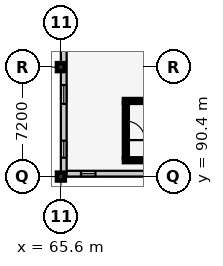
"""IFC4 building model, lengths in metres.
Left out: names, types, materials, properties, quantities, classifications, styles, units other than length and angle.
Written with IfcOpenShell. Run it as: python <this file> out.ifc"""

import sys

from ifc_helpers import new_model, si_unit, direction, frame, frame_2d, origin, origin_2d, place, context, subcontext, project, spatial, rectangle, extrude, element, fill, save


model = new_model("IFC4")
c1 = context("Model", 3, precision=1e-05, world=origin(), true_north=direction((0.0, 1.0)))
c2 = subcontext(c1, "Body", "Model", "MODEL_VIEW")
j1 = project(units=[si_unit("LENGTHUNIT", "METRE"), si_unit("PLANEANGLEUNIT", "RADIAN")], contexts=[c1])
p1 = place(None, origin())
s1 = spatial("IfcSite", under=j1, at=p1, CompositionType="ELEMENT")
p2 = place(p1, origin())
s2 = spatial("IfcBuilding", under=s1, at=p2, CompositionType="ELEMENT")
p3 = place(p2, frame((0.0, 0.0, 21.9)))
s3 = spatial("IfcBuildingStorey", under=s2, at=p3, CompositionType="ELEMENT", Elevation=21.9)
for number, where, z_axis, x_axis in (
    (1, (65.6, 90.4, 0.0), (0.0, 0.0, 1.0), (1.0, 0.0, 0.0)),
    (2, (65.6, 97.6, 0.0), (0.0, 0.0, 1.0), (1.0, 0.0, 0.0)),
):
    element("IfcColumn", number, at=place(p3, frame(where, z_axis=z_axis, x_axis=x_axis)), inside=s3, PredefinedType="COLUMN", context=c2, shape_type="SweptSolid", body=[
        extrude(rectangle(XDim=0.52, YDim=0.52, at=origin_2d()), origin(), (0.0, 0.0, 1.0), 3.9),
    ])
p4 = place(p3, frame((94.4, 90.59, 0.0), z_axis=(0.0, 0.0, 1.0), x_axis=(-1.0, 0.0, 0.0)))
e3 = element("IfcWall", 3, at=p4, inside=s3, PredefinedType="SOLIDWALL", context=c2, shape_type="SweptSolid", body=[
    extrude(rectangle(XDim=28.8, YDim=0.38, at=frame_2d((14.4, 0.0))), origin(), (0.0, 0.0, 1.0), 2.955),
])
p5 = place(p4, frame((1.05, 0.0, 0.9)))
e4 = element("IfcOpeningElement", 4, at=p5, cuts=e3, PredefinedType="OPENING", context=c2, shape_type="SweptSolid", body=[
    extrude(rectangle(XDim=1.5, YDim=1.75, at=frame_2d((0.75, 0.875))), frame((0.0, 0.202, 0.0), z_axis=(0.0, -1.0, 0.0), x_axis=(1.0, 0.0, 0.0)), (0.0, 0.0, 1.0), 0.404),
])
p6 = place(p4, frame((4.95, 0.0, 0.9)))
e5 = element("IfcOpeningElement", 5, at=p6, cuts=e3, PredefinedType="OPENING", context=c2, shape_type="SweptSolid", body=[
    extrude(rectangle(XDim=0.9, YDim=1.35, at=frame_2d((0.45, 0.675))), frame((0.0, 0.202, 0.0), z_axis=(0.0, -1.0, 0.0), x_axis=(1.0, 0.0, 0.0)), (0.0, 0.0, 1.0), 0.404),
])
p7 = place(p4, frame((8.5, 0.0, 0.9)))
e6 = element("IfcOpeningElement", 6, at=p7, cuts=e3, PredefinedType="OPENING", context=c2, shape_type="SweptSolid", body=[
    extrude(rectangle(XDim=1.0, YDim=1.35, at=frame_2d((0.5, 0.675))), frame((0.0, 0.202, 0.0), z_axis=(0.0, -1.0, 0.0), x_axis=(1.0, 0.0, 0.0)), (0.0, 0.0, 1.0), 0.404),
])
p8 = place(p4, frame((12.05, 0.0, 0.9)))
e7 = element("IfcOpeningElement", 7, at=p8, cuts=e3, PredefinedType="OPENING", context=c2, shape_type="SweptSolid", body=[
    extrude(rectangle(XDim=1.1, YDim=1.35, at=frame_2d((0.55, 0.675))), frame((0.0, 0.202, 0.0), z_axis=(0.0, -1.0, 0.0), x_axis=(1.0, 0.0, 0.0)), (0.0, 0.0, 1.0), 0.404),
])
p9 = place(p4, frame((15.6, 0.0, 0.9)))
e8 = element("IfcOpeningElement", 8, at=p9, cuts=e3, PredefinedType="OPENING", context=c2, shape_type="SweptSolid", body=[
    extrude(rectangle(XDim=1.2, YDim=1.35, at=frame_2d((0.6, 0.675))), frame((0.0, 0.202, 0.0), z_axis=(0.0, -1.0, 0.0), x_axis=(1.0, 0.0, 0.0)), (0.0, 0.0, 1.0), 0.404),
])
p10 = place(p4, frame((19.15, 0.0, 0.9)))
e9 = element("IfcOpeningElement", 9, at=p10, cuts=e3, PredefinedType="OPENING", context=c2, shape_type="SweptSolid", body=[
    extrude(rectangle(XDim=1.3, YDim=1.35, at=frame_2d((0.65, 0.675))), frame((0.0, 0.202, 0.0), z_axis=(0.0, -1.0, 0.0), x_axis=(1.0, 0.0, 0.0)), (0.0, 0.0, 1.0), 0.404),
])
p11 = place(p4, frame((26.525, 0.0, 0.9)))
e10 = element("IfcOpeningElement", 10, at=p11, cuts=e3, PredefinedType="OPENING", context=c2, shape_type="SweptSolid", body=[
    extrude(rectangle(XDim=0.95, YDim=1.45, at=frame_2d((0.475, 0.725))), frame((0.0, 0.202, 0.0), z_axis=(0.0, -1.0, 0.0), x_axis=(1.0, 0.0, 0.0)), (0.0, 0.0, 1.0), 0.404),
])
p12 = place(p3, frame((65.79, 90.4, 0.0), z_axis=(0.0, 0.0, 1.0), x_axis=(0.0, 1.0, 0.0)))
e11 = element("IfcWall", 11, at=p12, inside=s3, PredefinedType="SOLIDWALL", context=c2, shape_type="SweptSolid", body=[
    extrude(rectangle(XDim=14.4, YDim=0.38, at=frame_2d((7.2, 0.0))), origin(), (0.0, 0.0, 1.0), 2.915),
])
p13 = place(p12, frame((1.24, 0.0, 0.9)))
e12 = element("IfcOpeningElement", 12, at=p13, cuts=e11, PredefinedType="OPENING", context=c2, shape_type="SweptSolid", body=[
    extrude(rectangle(XDim=1.12, YDim=1.75, at=frame_2d((0.56, 0.875))), frame((0.0, 0.202, 0.0), z_axis=(0.0, -1.0, 0.0), x_axis=(1.0, 0.0, 0.0)), (0.0, 0.0, 1.0), 0.404),
])
p14 = place(p12, frame((4.78, 0.0, 0.9)))
e13 = element("IfcOpeningElement", 13, at=p14, cuts=e11, PredefinedType="OPENING", context=c2, shape_type="SweptSolid", body=[
    extrude(rectangle(XDim=1.24, YDim=1.75, at=frame_2d((0.62, 0.875))), frame((0.0, 0.202, 0.0), z_axis=(0.0, -1.0, 0.0), x_axis=(1.0, 0.0, 0.0)), (0.0, 0.0, 1.0), 0.404),
])
p15 = place(p12, frame((11.88, 0.0, 0.9)))
e14 = element("IfcOpeningElement", 14, at=p15, cuts=e11, PredefinedType="OPENING", context=c2, shape_type="SweptSolid", body=[
    extrude(rectangle(XDim=1.44, YDim=1.75, at=frame_2d((0.72, 0.875))), frame((0.0, 0.202, 0.0), z_axis=(0.0, -1.0, 0.0), x_axis=(1.0, 0.0, 0.0)), (0.0, 0.0, 1.0), 0.404),
])
p16 = place(p3, frame((69.75, 91.475, 0.0), z_axis=(0.0, 0.0, 1.0), x_axis=(1.0, 0.0, 0.0)))
e15 = element("IfcWall", 15, at=p16, inside=s3, PredefinedType="SHEAR", context=c2, shape_type="SweptSolid", body=[
    extrude(rectangle(XDim=9.57, YDim=0.25, at=frame_2d((4.785, 0.0))), origin(), (0.0, 0.0, 1.0), 3.66),
])
p17 = place(p3, frame((78.75, 95.375, 0.0), z_axis=(0.0, 0.0, 1.0), x_axis=(-1.0, 0.0, 0.0)))
e16 = element("IfcWall", 16, at=p17, inside=s3, PredefinedType="SHEAR", context=c2, shape_type="SweptSolid", body=[
    extrude(rectangle(XDim=9.0, YDim=0.25, at=frame_2d((4.5, 0.0))), origin(), (0.0, 0.0, 1.0), 3.66),
])
p18 = place(p3, frame((69.875, 95.25, 0.0), z_axis=(0.0, 0.0, 1.0), x_axis=(0.0, -1.0, 0.0)))
e17 = element("IfcWall", 17, at=p18, inside=s3, PredefinedType="SHEAR", context=c2, shape_type="SweptSolid", body=[
    extrude(rectangle(XDim=3.65, YDim=0.25, at=frame_2d((1.825, 0.0))), origin(), (0.0, 0.0, 1.0), 3.66),
])
p19 = place(p18, frame((1.2, 0.0, 0.0)))
e18 = element("IfcOpeningElement", 18, at=p19, cuts=e17, PredefinedType="OPENING", context=c2, shape_type="SweptSolid", body=[
    extrude(rectangle(XDim=1.25, YDim=2.15, at=frame_2d((0.625, 1.075))), frame((0.0, 0.137, 0.0), z_axis=(0.0, -1.0, 0.0), x_axis=(1.0, 0.0, 0.0)), (0.0, 0.0, 1.0), 0.274),
])
p20 = place(p11, origin())
e19 = element("IfcWindow", 19, at=p20, inside=s3, PartitioningType="SINGLE_PANEL", PredefinedType="WINDOW", context=c2, shape_type="SweptSolid", body=[
    extrude(rectangle(XDim=0.95, YDim=1.45, at=frame_2d((0.475, 0.725))), frame((0.0, 0.03, 0.0), z_axis=(0.0, -1.0, 0.0), x_axis=(1.0, 0.0, 0.0)), (0.0, 0.0, 1.0), 0.06),
])
fill(e10, e19)
p21 = place(p13, origin())
e20 = element("IfcWindow", 20, at=p21, inside=s3, PartitioningType="SINGLE_PANEL", PredefinedType="WINDOW", context=c2, shape_type="SweptSolid", body=[
    extrude(rectangle(XDim=1.12, YDim=1.75, at=frame_2d((0.56, 0.875))), frame((0.0, 0.03, 0.0), z_axis=(0.0, -1.0, 0.0), x_axis=(1.0, 0.0, 0.0)), (0.0, 0.0, 1.0), 0.06),
])
fill(e12, e20)
p22 = place(p14, origin())
e21 = element("IfcWindow", 21, at=p22, inside=s3, PartitioningType="SINGLE_PANEL", PredefinedType="WINDOW", context=c2, shape_type="SweptSolid", body=[
    extrude(rectangle(XDim=1.24, YDim=1.75, at=frame_2d((0.62, 0.875))), frame((0.0, 0.03, 0.0), z_axis=(0.0, -1.0, 0.0), x_axis=(1.0, 0.0, 0.0)), (0.0, 0.0, 1.0), 0.06),
])
fill(e13, e21)
p23 = place(p19, origin())
e22 = element("IfcDoor", 22, at=p23, inside=s3, OperationType="SINGLE_SWING_RIGHT", PredefinedType="DOOR", context=c2, shape_type="SweptSolid", body=[
    extrude(rectangle(XDim=1.25, YDim=2.15, at=frame_2d((0.625, 1.075))), frame((0.0, 0.025, 0.0), z_axis=(0.0, -1.0, 0.0), x_axis=(1.0, 0.0, 0.0)), (0.0, 0.0, 1.0), 0.05),
])
fill(e18, e22)
save(model, sys.argv[1])
